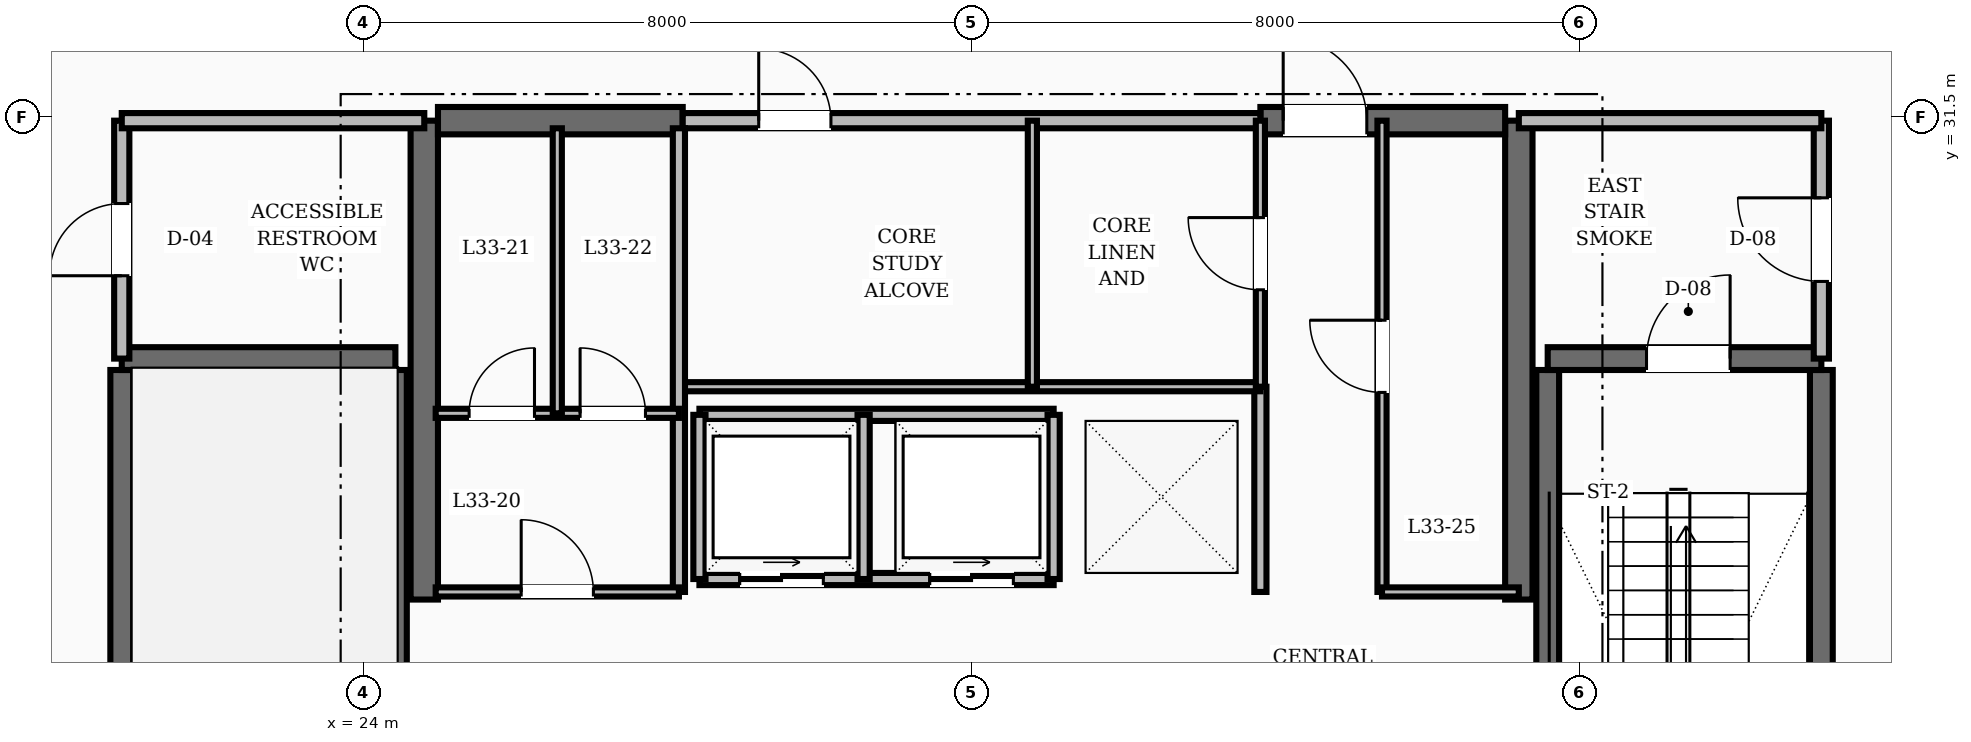
"""IFC4 building model, lengths in metres.
Left out: names, types, materials, properties, quantities, classifications, styles, units other than length and angle.
Written with IfcOpenShell. Run it as: python <this file> out.ifc"""

import sys

from ifc_helpers import new_model, si_unit, direction, frame, frame_2d, origin, place, context, subcontext, project, spatial, rectangle, extrude, element, fill, save


model = new_model("IFC4")
c1 = context("Model", 3, precision=1e-05, world=origin(), true_north=direction((0.0, 1.0)))
c2 = subcontext(c1, "Body", "Model", "MODEL_VIEW")
j1 = project(units=[si_unit("LENGTHUNIT", "METRE"), si_unit("PLANEANGLEUNIT", "RADIAN")], contexts=[c1])
p1 = place(None, origin())
s1 = spatial("IfcSite", under=j1, at=p1, CompositionType="ELEMENT")
p2 = place(p1, origin())
s2 = spatial("IfcBuilding", under=s1, at=p2, CompositionType="ELEMENT")
p3 = place(p2, frame((0.0, 0.0, 131.6)))
s3 = spatial("IfcBuildingStorey", under=s2, at=p3, CompositionType="ELEMENT", Elevation=131.6)
for number, where, z_axis, x_axis in (
    (1, (24.8, 25.15, 0.0), (0.0, 0.0, 1.0), (0.0, 1.0, 0.0)),
    (2, (39.2, 25.15, 0.0), (0.0, 0.0, 1.0), (0.0, 1.0, 0.0)),
):
    element("IfcWall", number, at=place(p3, frame(where, z_axis=z_axis, x_axis=x_axis)), inside=s3, PredefinedType="SHEAR", context=c2, shape_type="SweptSolid", body=[
        extrude(rectangle(XDim=6.3, YDim=0.36, at=frame_2d((3.15, 0.0))), origin(), (0.0, 0.0, 1.0), 3.6),
    ])
p4 = place(p3, frame((24.98, 31.45, 0.0), z_axis=(0.0, 0.0, 1.0), x_axis=(1.0, 0.0, 0.0)))
e3 = element("IfcWall", 3, at=p4, inside=s3, PredefinedType="SHEAR", context=c2, shape_type="SweptSolid", body=[
    extrude(rectangle(XDim=3.22, YDim=0.36, at=frame_2d((1.61, 0.0))), origin(), (0.0, 0.0, 1.0), 3.6),
])
p5 = place(p3, frame((35.8, 31.45, 0.0), z_axis=(0.0, 0.0, 1.0), x_axis=(1.0, 0.0, 0.0)))
e4 = element("IfcWall", 4, at=p5, inside=s3, PredefinedType="SHEAR", context=c2, shape_type="SweptSolid", body=[
    extrude(rectangle(XDim=3.22, YDim=0.36, at=frame_2d((1.61, 0.0))), origin(), (0.0, 0.0, 1.0), 3.6),
])
p6 = place(p5, frame((0.3, 0.0, 0.0)))
e5 = element("IfcOpeningElement", 5, at=p6, cuts=e4, PredefinedType="OPENING", context=c2, shape_type="SweptSolid", body=[
    extrude(rectangle(XDim=1.1, YDim=2.1, at=frame_2d((0.55, 1.05))), frame((0.0, 0.19, 0.0), z_axis=(0.0, -1.0, 0.0), x_axis=(1.0, 0.0, 0.0)), (0.0, 0.0, 1.0), 0.38),
])
for number, where, z_axis, x_axis in (
    (6, (20.82, 19.43, 0.0), (0.0, 0.0, 1.0), (0.0, 1.0, 0.0)),
    (7, (24.42, 19.43, 0.0), (0.0, 0.0, 1.0), (0.0, 1.0, 0.0)),
):
    element("IfcWall", number, at=place(p3, frame(where, z_axis=z_axis, x_axis=x_axis)), inside=s3, PredefinedType="SHEAR", context=c2, shape_type="SweptSolid", body=[
        extrude(rectangle(XDim=8.74, YDim=0.3, at=frame_2d((4.37, 0.0))), origin(), (0.0, 0.0, 1.0), 3.6),
    ])
p7 = place(p3, frame((20.82, 28.32, 0.0), z_axis=(0.0, 0.0, 1.0), x_axis=(1.0, 0.0, 0.0)))
e8 = element("IfcWall", 8, at=p7, inside=s3, PredefinedType="SHEAR", context=c2, shape_type="SweptSolid", body=[
    extrude(rectangle(XDim=3.6, YDim=0.3, at=frame_2d((1.8, 0.0))), origin(), (0.0, 0.0, 1.0), 3.6),
])
for number, where, z_axis, x_axis in (
    (9, (43.18, 19.43, 0.0), (0.0, 0.0, 1.0), (0.0, 1.0, 0.0)),
    (10, (39.58, 19.43, 0.0), (0.0, 0.0, 1.0), (0.0, 1.0, 0.0)),
):
    element("IfcWall", number, at=place(p3, frame(where, z_axis=z_axis, x_axis=x_axis)), inside=s3, PredefinedType="SHEAR", context=c2, shape_type="SweptSolid", body=[
        extrude(rectangle(XDim=8.74, YDim=0.3, at=frame_2d((4.37, 0.0))), origin(), (0.0, 0.0, 1.0), 3.6),
    ])
p8 = place(p3, frame((39.58, 28.32, 0.0), z_axis=(0.0, 0.0, 1.0), x_axis=(1.0, 0.0, 0.0)))
e11 = element("IfcWall", 11, at=p8, inside=s3, PredefinedType="SHEAR", context=c2, shape_type="SweptSolid", body=[
    extrude(rectangle(XDim=3.6, YDim=0.3, at=frame_2d((1.8, 0.0))), origin(), (0.0, 0.0, 1.0), 3.6),
])
p9 = place(p8, frame((1.3, 0.0, 0.0)))
e12 = element("IfcOpeningElement", 12, at=p9, cuts=e11, PredefinedType="OPENING", context=c2, shape_type="SweptSolid", body=[
    extrude(rectangle(XDim=1.1, YDim=2.1, at=frame_2d((0.55, 1.05))), frame((0.0, 0.16, 0.0), z_axis=(0.0, -1.0, 0.0), x_axis=(1.0, 0.0, 0.0)), (0.0, 0.0, 1.0), 0.32),
])
p10 = place(p3, frame((43.18, 28.32, 0.0), z_axis=(0.0, 0.0, 1.0), x_axis=(0.0, 1.0, 0.0)))
e13 = element("IfcWall", 13, at=p10, inside=s3, PredefinedType="SOLIDWALL", context=c2, shape_type="SweptSolid", body=[
    extrude(rectangle(XDim=3.13, YDim=0.2, at=frame_2d((1.565, 0.0))), origin(), (0.0, 0.0, 1.0), 2.8),
])
p11 = place(p10, frame((1.015, 0.0, 0.0)))
e14 = element("IfcOpeningElement", 14, at=p11, cuts=e13, PredefinedType="OPENING", context=c2, shape_type="SweptSolid", body=[
    extrude(rectangle(XDim=1.1, YDim=2.1, at=frame_2d((0.55, 1.05))), frame((0.0, 0.11, 0.0), z_axis=(0.0, -1.0, 0.0), x_axis=(1.0, 0.0, 0.0)), (0.0, 0.0, 1.0), 0.22),
])
p12 = place(p3, frame((39.2, 31.45, 0.0), z_axis=(0.0, 0.0, 1.0), x_axis=(1.0, 0.0, 0.0)))
e15 = element("IfcWall", 15, at=p12, inside=s3, PredefinedType="SOLIDWALL", context=c2, shape_type="SweptSolid", body=[
    extrude(rectangle(XDim=3.98, YDim=0.2, at=frame_2d((1.99, 0.0))), origin(), (0.0, 0.0, 1.0), 2.8),
])
p13 = place(p3, frame((20.82, 28.32, 0.0), z_axis=(0.0, 0.0, 1.0), x_axis=(0.0, 1.0, 0.0)))
e16 = element("IfcWall", 16, at=p13, inside=s3, PredefinedType="SOLIDWALL", context=c2, shape_type="SweptSolid", body=[
    extrude(rectangle(XDim=3.13, YDim=0.2, at=frame_2d((1.565, 0.0))), origin(), (0.0, 0.0, 1.0), 2.8),
])
p14 = place(p13, frame((1.09, 0.0, 0.0)))
e17 = element("IfcOpeningElement", 17, at=p14, cuts=e16, PredefinedType="OPENING", context=c2, shape_type="SweptSolid", body=[
    extrude(rectangle(XDim=0.95, YDim=2.1, at=frame_2d((0.475, 1.05))), frame((0.0, 0.11, 0.0), z_axis=(0.0, -1.0, 0.0), x_axis=(1.0, 0.0, 0.0)), (0.0, 0.0, 1.0), 0.22),
])
p15 = place(p3, frame((20.82, 31.45, 0.0), z_axis=(0.0, 0.0, 1.0), x_axis=(1.0, 0.0, 0.0)))
e18 = element("IfcWall", 18, at=p15, inside=s3, PredefinedType="SOLIDWALL", context=c2, shape_type="SweptSolid", body=[
    extrude(rectangle(XDim=3.98, YDim=0.2, at=frame_2d((1.99, 0.0))), origin(), (0.0, 0.0, 1.0), 2.8),
])
p16 = place(p3, frame((35.8, 25.25, 0.0), z_axis=(0.0, 0.0, 1.0), x_axis=(0.0, 1.0, 0.0)))
e19 = element("IfcWall", 19, at=p16, inside=s3, PredefinedType="SOLIDWALL", context=c2, shape_type="SweptSolid", body=[
    extrude(rectangle(XDim=2.7, YDim=0.16, at=frame_2d((1.35, 0.0))), origin(), (0.0, 0.0, 1.0), 2.8),
])
p17 = place(p3, frame((28.42, 25.42, 0.0), z_axis=(0.0, 0.0, 1.0), x_axis=(1.0, 0.0, 0.0)))
e20 = element("IfcWall", 20, at=p17, inside=s3, PredefinedType="SOLIDWALL", context=c2, shape_type="SweptSolid", body=[
    extrude(rectangle(XDim=4.66, YDim=0.16, at=frame_2d((2.33, 0.0))), origin(), (0.0, 0.0, 1.0), 2.8),
])
p18 = place(p17, frame((0.53, 0.0, 0.0)))
e21 = element("IfcOpeningElement", 21, at=p18, cuts=e20, PredefinedType="OPENING", context=c2, shape_type="SweptSolid", body=[
    extrude(rectangle(XDim=1.1, YDim=2.15, at=frame_2d((0.55, 1.075))), frame((0.0, 0.09, 0.0), z_axis=(0.0, -1.0, 0.0), x_axis=(1.0, 0.0, 0.0)), (0.0, 0.0, 1.0), 0.18),
])
p19 = place(p17, frame((3.03, 0.0, 0.0)))
e22 = element("IfcOpeningElement", 22, at=p19, cuts=e20, PredefinedType="OPENING", context=c2, shape_type="SweptSolid", body=[
    extrude(rectangle(XDim=1.1, YDim=2.15, at=frame_2d((0.55, 1.075))), frame((0.0, 0.09, 0.0), z_axis=(0.0, -1.0, 0.0), x_axis=(1.0, 0.0, 0.0)), (0.0, 0.0, 1.0), 0.18),
])
p20 = place(p3, frame((28.42, 27.58, 0.0), z_axis=(0.0, 0.0, 1.0), x_axis=(1.0, 0.0, 0.0)))
e23 = element("IfcWall", 23, at=p20, inside=s3, PredefinedType="SOLIDWALL", context=c2, shape_type="SweptSolid", body=[
    extrude(rectangle(XDim=4.66, YDim=0.16, at=frame_2d((2.33, 0.0))), origin(), (0.0, 0.0, 1.0), 2.8),
])
for number, where, z_axis, x_axis in (
    (24, (28.42, 25.42, 0.0), (0.0, 0.0, 1.0), (0.0, 1.0, 0.0)),
    (25, (30.58, 25.42, 0.0), (0.0, 0.0, 1.0), (0.0, 1.0, 0.0)),
    (26, (33.08, 25.42, 0.0), (0.0, 0.0, 1.0), (0.0, 1.0, 0.0)),
):
    element("IfcWall", number, at=place(p3, frame(where, z_axis=z_axis, x_axis=x_axis)), inside=s3, PredefinedType="SOLIDWALL", context=c2, shape_type="SweptSolid", body=[
        extrude(rectangle(XDim=2.16, YDim=0.16, at=frame_2d((1.08, 0.0))), origin(), (0.0, 0.0, 1.0), 2.8),
    ])
p21 = place(p3, frame((28.2, 31.45, 0.0), z_axis=(0.0, 0.0, 1.0), x_axis=(1.0, 0.0, 0.0)))
e27 = element("IfcWall", 27, at=p21, inside=s3, PredefinedType="SOLIDWALL", context=c2, shape_type="SweptSolid", body=[
    extrude(rectangle(XDim=7.6, YDim=0.2, at=frame_2d((3.8, 0.0))), origin(), (0.0, 0.0, 1.0), 2.8),
])
p22 = place(p21, frame((1.0, 0.0, 0.0)))
e28 = element("IfcOpeningElement", 28, at=p22, cuts=e27, PredefinedType="OPENING", context=c2, shape_type="SweptSolid", body=[
    extrude(rectangle(XDim=0.95, YDim=2.1, at=frame_2d((0.475, 1.05))), frame((0.0, 0.11, 0.0), z_axis=(0.0, -1.0, 0.0), x_axis=(1.0, 0.0, 0.0)), (0.0, 0.0, 1.0), 0.22),
])
p23 = place(p3, frame((28.2, 27.95, 0.0), z_axis=(0.0, 0.0, 1.0), x_axis=(1.0, 0.0, 0.0)))
e29 = element("IfcWall", 29, at=p23, inside=s3, PredefinedType="PARTITIONING", context=c2, shape_type="SweptSolid", body=[
    extrude(rectangle(XDim=7.6, YDim=0.12, at=frame_2d((3.8, 0.0))), origin(), (0.0, 0.0, 1.0), 2.8),
])
p24 = place(p3, frame((35.8, 27.95, 0.0), z_axis=(0.0, 0.0, 1.0), x_axis=(0.0, 1.0, 0.0)))
e30 = element("IfcWall", 30, at=p24, inside=s3, PredefinedType="PARTITIONING", context=c2, shape_type="SweptSolid", body=[
    extrude(rectangle(XDim=3.5, YDim=0.12, at=frame_2d((1.75, 0.0))), origin(), (0.0, 0.0, 1.0), 2.8),
])
p25 = place(p24, frame((1.275, 0.0, 0.0)))
e31 = element("IfcOpeningElement", 31, at=p25, cuts=e30, PredefinedType="OPENING", context=c2, shape_type="SweptSolid", body=[
    extrude(rectangle(XDim=0.95, YDim=2.1, at=frame_2d((0.475, 1.05))), frame((0.0, 0.07, 0.0), z_axis=(0.0, -1.0, 0.0), x_axis=(1.0, 0.0, 0.0)), (0.0, 0.0, 1.0), 0.14),
])
p26 = place(p3, frame((32.8, 27.95, 0.0), z_axis=(0.0, 0.0, 1.0), x_axis=(0.0, 1.0, 0.0)))
e32 = element("IfcWall", 32, at=p26, inside=s3, PredefinedType="PARTITIONING", context=c2, shape_type="SweptSolid", body=[
    extrude(rectangle(XDim=3.5, YDim=0.12, at=frame_2d((1.75, 0.0))), origin(), (0.0, 0.0, 1.0), 2.8),
])
p27 = place(p3, frame((28.15, 25.25, 0.0), z_axis=(0.0, 0.0, 1.0), x_axis=(0.0, 1.0, 0.0)))
e33 = element("IfcWall", 33, at=p27, inside=s3, PredefinedType="SOLIDWALL", context=c2, shape_type="SweptSolid", body=[
    extrude(rectangle(XDim=6.1, YDim=0.16, at=frame_2d((3.05, 0.0))), origin(), (0.0, 0.0, 1.0), 2.8),
])
p28 = place(p3, frame((24.95, 25.25, 0.0), z_axis=(0.0, 0.0, 1.0), x_axis=(1.0, 0.0, 0.0)))
e34 = element("IfcWall", 34, at=p28, inside=s3, PredefinedType="PARTITIONING", context=c2, shape_type="SweptSolid", body=[
    extrude(rectangle(XDim=3.2, YDim=0.12, at=frame_2d((1.6, 0.0))), origin(), (0.0, 0.0, 1.0), 2.8),
])
p29 = place(p28, frame((1.125, 0.0, 0.0)))
e35 = element("IfcOpeningElement", 35, at=p29, cuts=e34, PredefinedType="OPENING", context=c2, shape_type="SweptSolid", body=[
    extrude(rectangle(XDim=0.95, YDim=2.1, at=frame_2d((0.475, 1.05))), frame((0.0, 0.07, 0.0), z_axis=(0.0, -1.0, 0.0), x_axis=(1.0, 0.0, 0.0)), (0.0, 0.0, 1.0), 0.14),
])
p30 = place(p3, frame((37.4, 25.25, 0.0), z_axis=(0.0, 0.0, 1.0), x_axis=(0.0, 1.0, 0.0)))
e36 = element("IfcWall", 36, at=p30, inside=s3, PredefinedType="PARTITIONING", context=c2, shape_type="SweptSolid", body=[
    extrude(rectangle(XDim=6.2, YDim=0.12, at=frame_2d((3.1, 0.0))), origin(), (0.0, 0.0, 1.0), 2.8),
])
p31 = place(p30, frame((2.625, 0.0, 0.0)))
e37 = element("IfcOpeningElement", 37, at=p31, cuts=e36, PredefinedType="OPENING", context=c2, shape_type="SweptSolid", body=[
    extrude(rectangle(XDim=0.95, YDim=2.1, at=frame_2d((0.475, 1.05))), frame((0.0, 0.07, 0.0), z_axis=(0.0, -1.0, 0.0), x_axis=(1.0, 0.0, 0.0)), (0.0, 0.0, 1.0), 0.14),
])
p32 = place(p3, frame((37.4, 25.25, 0.0), z_axis=(0.0, 0.0, 1.0), x_axis=(1.0, 0.0, 0.0)))
e38 = element("IfcWall", 38, at=p32, inside=s3, PredefinedType="PARTITIONING", context=c2, shape_type="SweptSolid", body=[
    extrude(rectangle(XDim=1.8, YDim=0.12, at=frame_2d((0.9, 0.0))), origin(), (0.0, 0.0, 1.0), 2.8),
])
p33 = place(p3, frame((24.95, 27.6, 0.0), z_axis=(0.0, 0.0, 1.0), x_axis=(1.0, 0.0, 0.0)))
e39 = element("IfcWall", 39, at=p33, inside=s3, PredefinedType="PARTITIONING", context=c2, shape_type="SweptSolid", body=[
    extrude(rectangle(XDim=3.2, YDim=0.12, at=frame_2d((1.6, 0.0))), origin(), (0.0, 0.0, 1.0), 2.8),
])
p34 = place(p33, frame((0.44, 0.0, 0.0)))
e40 = element("IfcOpeningElement", 40, at=p34, cuts=e39, PredefinedType="OPENING", context=c2, shape_type="SweptSolid", body=[
    extrude(rectangle(XDim=0.86, YDim=2.1, at=frame_2d((0.43, 1.05))), frame((0.0, 0.07, 0.0), z_axis=(0.0, -1.0, 0.0), x_axis=(1.0, 0.0, 0.0)), (0.0, 0.0, 1.0), 0.14),
])
p35 = place(p33, frame((1.9, 0.0, 0.0)))
e41 = element("IfcOpeningElement", 41, at=p35, cuts=e39, PredefinedType="OPENING", context=c2, shape_type="SweptSolid", body=[
    extrude(rectangle(XDim=0.86, YDim=2.1, at=frame_2d((0.43, 1.05))), frame((0.0, 0.07, 0.0), z_axis=(0.0, -1.0, 0.0), x_axis=(1.0, 0.0, 0.0)), (0.0, 0.0, 1.0), 0.14),
])
p36 = place(p3, frame((26.55, 27.6, 0.0), z_axis=(0.0, 0.0, 1.0), x_axis=(0.0, 1.0, 0.0)))
e42 = element("IfcWall", 42, at=p36, inside=s3, PredefinedType="PARTITIONING", context=c2, shape_type="SweptSolid", body=[
    extrude(rectangle(XDim=3.75, YDim=0.12, at=frame_2d((1.875, 0.0))), origin(), (0.0, 0.0, 1.0), 2.8),
])
p37 = place(p9, origin())
e43 = element("IfcDoor", 43, at=p37, inside=s3, OperationType="SINGLE_SWING_RIGHT", PredefinedType="DOOR", context=c2, shape_type="SweptSolid", body=[
    extrude(rectangle(XDim=1.1, YDim=2.1, at=frame_2d((0.55, 1.05))), frame((0.0, 0.025, 0.0), z_axis=(0.0, -1.0, 0.0), x_axis=(1.0, 0.0, 0.0)), (0.0, 0.0, 1.0), 0.05),
])
fill(e12, e43)
p38 = place(p11, origin())
e44 = element("IfcDoor", 44, at=p38, inside=s3, OperationType="SINGLE_SWING_RIGHT", PredefinedType="DOOR", context=c2, shape_type="SweptSolid", body=[
    extrude(rectangle(XDim=1.1, YDim=2.1, at=frame_2d((0.55, 1.05))), frame((0.0, 0.025, 0.0), z_axis=(0.0, -1.0, 0.0), x_axis=(1.0, 0.0, 0.0)), (0.0, 0.0, 1.0), 0.05),
])
fill(e14, e44)
p39 = place(p14, origin())
e45 = element("IfcDoor", 45, at=p39, inside=s3, OperationType="SINGLE_SWING_LEFT", PredefinedType="DOOR", context=c2, shape_type="SweptSolid", body=[
    extrude(rectangle(XDim=0.95, YDim=2.1, at=frame_2d((0.475, 1.05))), frame((0.0, 0.025, 0.0), z_axis=(0.0, -1.0, 0.0), x_axis=(1.0, 0.0, 0.0)), (0.0, 0.0, 1.0), 0.05),
])
fill(e17, e45)
p40 = place(p6, origin())
e46 = element("IfcDoor", 46, at=p40, inside=s3, OperationType="SINGLE_SWING_LEFT", PredefinedType="DOOR", context=c2, shape_type="SweptSolid", body=[
    extrude(rectangle(XDim=1.1, YDim=2.1, at=frame_2d((0.55, 1.05))), frame((0.0, 0.025, 0.0), z_axis=(0.0, -1.0, 0.0), x_axis=(1.0, 0.0, 0.0)), (0.0, 0.0, 1.0), 0.05),
])
fill(e5, e46)
p41 = place(p18, origin())
e47 = element("IfcDoor", 47, at=p41, inside=s3, OperationType="SLIDING_TO_RIGHT", PredefinedType="DOOR", context=c2, shape_type="SweptSolid", body=[
    extrude(rectangle(XDim=1.1, YDim=2.15, at=frame_2d((0.55, 1.075))), frame((0.0, 0.025, 0.0), z_axis=(0.0, -1.0, 0.0), x_axis=(1.0, 0.0, 0.0)), (0.0, 0.0, 1.0), 0.05),
])
fill(e21, e47)
p42 = place(p19, origin())
e48 = element("IfcDoor", 48, at=p42, inside=s3, OperationType="SLIDING_TO_RIGHT", PredefinedType="DOOR", context=c2, shape_type="SweptSolid", body=[
    extrude(rectangle(XDim=1.1, YDim=2.15, at=frame_2d((0.55, 1.075))), frame((0.0, 0.025, 0.0), z_axis=(0.0, -1.0, 0.0), x_axis=(1.0, 0.0, 0.0)), (0.0, 0.0, 1.0), 0.05),
])
fill(e22, e48)
p43 = place(p22, origin())
e49 = element("IfcDoor", 49, at=p43, inside=s3, OperationType="SINGLE_SWING_LEFT", PredefinedType="DOOR", context=c2, shape_type="SweptSolid", body=[
    extrude(rectangle(XDim=0.95, YDim=2.1, at=frame_2d((0.475, 1.05))), frame((0.0, 0.025, 0.0), z_axis=(0.0, -1.0, 0.0), x_axis=(1.0, 0.0, 0.0)), (0.0, 0.0, 1.0), 0.05),
])
fill(e28, e49)
p44 = place(p25, origin())
e50 = element("IfcDoor", 50, at=p44, inside=s3, OperationType="SINGLE_SWING_RIGHT", PredefinedType="DOOR", context=c2, shape_type="SweptSolid", body=[
    extrude(rectangle(XDim=0.95, YDim=2.1, at=frame_2d((0.475, 1.05))), frame((0.0, 0.025, 0.0), z_axis=(0.0, -1.0, 0.0), x_axis=(1.0, 0.0, 0.0)), (0.0, 0.0, 1.0), 0.05),
])
fill(e31, e50)
p45 = place(p29, origin())
e51 = element("IfcDoor", 51, at=p45, inside=s3, OperationType="SINGLE_SWING_LEFT", PredefinedType="DOOR", context=c2, shape_type="SweptSolid", body=[
    extrude(rectangle(XDim=0.95, YDim=2.1, at=frame_2d((0.475, 1.05))), frame((0.0, 0.025, 0.0), z_axis=(0.0, -1.0, 0.0), x_axis=(1.0, 0.0, 0.0)), (0.0, 0.0, 1.0), 0.05),
])
fill(e35, e51)
p46 = place(p34, origin())
e52 = element("IfcDoor", 52, at=p46, inside=s3, OperationType="SINGLE_SWING_RIGHT", PredefinedType="DOOR", context=c2, shape_type="SweptSolid", body=[
    extrude(rectangle(XDim=0.86, YDim=2.1, at=frame_2d((0.43, 1.05))), frame((0.0, 0.025, 0.0), z_axis=(0.0, -1.0, 0.0), x_axis=(1.0, 0.0, 0.0)), (0.0, 0.0, 1.0), 0.05),
])
fill(e40, e52)
p47 = place(p35, origin())
e53 = element("IfcDoor", 53, at=p47, inside=s3, OperationType="SINGLE_SWING_LEFT", PredefinedType="DOOR", context=c2, shape_type="SweptSolid", body=[
    extrude(rectangle(XDim=0.86, YDim=2.1, at=frame_2d((0.43, 1.05))), frame((0.0, 0.025, 0.0), z_axis=(0.0, -1.0, 0.0), x_axis=(1.0, 0.0, 0.0)), (0.0, 0.0, 1.0), 0.05),
])
fill(e41, e53)
p48 = place(p31, origin())
e54 = element("IfcDoor", 54, at=p48, inside=s3, OperationType="SINGLE_SWING_RIGHT", PredefinedType="DOOR", context=c2, shape_type="SweptSolid", body=[
    extrude(rectangle(XDim=0.95, YDim=2.1, at=frame_2d((0.475, 1.05))), frame((0.0, 0.025, 0.0), z_axis=(0.0, -1.0, 0.0), x_axis=(1.0, 0.0, 0.0)), (0.0, 0.0, 1.0), 0.05),
])
fill(e37, e54)
save(model, sys.argv[1])
